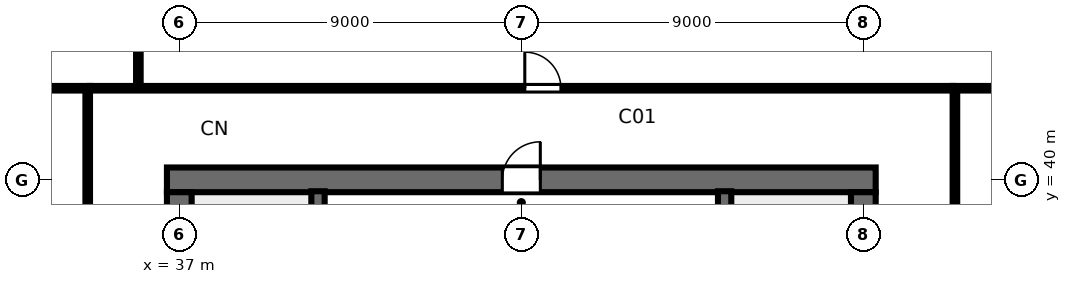
"""IFC4 building model, lengths in metres.
Left out: names, types, materials, properties, quantities, classifications, styles, units other than length and angle.
Written with IfcOpenShell. Run it as: python <this file> out.ifc"""

import sys

from ifc_helpers import new_model, si_unit, direction, frame, frame_2d, origin, place, context, subcontext, project, spatial, rectangle, extrude, element, fill, save


model = new_model("IFC4")
c1 = context("Model", 3, precision=1e-05, world=origin(), true_north=direction((0.0, 1.0)))
c2 = subcontext(c1, "Body", "Model", "MODEL_VIEW")
j1 = project(units=[si_unit("LENGTHUNIT", "METRE"), si_unit("PLANEANGLEUNIT", "RADIAN")], contexts=[c1])
p1 = place(None, origin())
s1 = spatial("IfcSite", under=j1, at=p1, CompositionType="ELEMENT")
p2 = place(p1, origin())
s2 = spatial("IfcBuilding", under=s1, at=p2, CompositionType="ELEMENT")
p3 = place(p2, frame((0.0, 0.0, 14.0)))
s3 = spatial("IfcBuildingStorey", under=s2, at=p3, CompositionType="ELEMENT", Elevation=14.0)
p4 = place(p3, frame((36.675, 40.0, 0.0), z_axis=(0.0, 0.0, 1.0), x_axis=(1.0, 0.0, 0.0)))
e1 = element("IfcWall", 1, at=p4, inside=s3, PredefinedType="SHEAR", context=c2, shape_type="SweptSolid", body=[
    extrude(rectangle(XDim=18.65, YDim=0.65, at=frame_2d((9.325, 0.0))), origin(), (0.0, 0.0, 1.0), 4.22),
])
p5 = place(p4, frame((8.825, 0.0, 0.0)))
e2 = element("IfcOpeningElement", 2, at=p5, cuts=e1, PredefinedType="OPENING", context=c2, shape_type="SweptSolid", body=[
    extrude(rectangle(XDim=1.0, YDim=2.15, at=frame_2d((0.5, 1.075))), frame((0.0, 0.335, 0.0), z_axis=(0.0, -1.0, 0.0), x_axis=(1.0, 0.0, 0.0)), (0.0, 0.0, 1.0), 0.67),
])
p6 = place(p3, frame((37.0, 24.325, 0.0), z_axis=(0.0, 0.0, 1.0), x_axis=(0.0, 1.0, 0.0)))
e3 = element("IfcWall", 3, at=p6, inside=s3, PredefinedType="SHEAR", context=c2, shape_type="SweptSolid", body=[
    extrude(rectangle(XDim=15.35, YDim=0.65, at=frame_2d((7.675, 0.0))), origin(), (0.0, 0.0, 1.0), 4.22),
])
p7 = place(p6, frame((5.2, 0.0, 0.0)))
e4 = element("IfcOpeningElement", 4, at=p7, cuts=e3, PredefinedType="OPENING", context=c2, shape_type="SweptSolid", body=[
    extrude(rectangle(XDim=1.15, YDim=2.15, at=frame_2d((0.575, 1.075))), frame((0.0, 0.335, 0.0), z_axis=(0.0, -1.0, 0.0), x_axis=(1.0, 0.0, 0.0)), (0.0, 0.0, 1.0), 0.67),
])
p8 = place(p3, frame((55.0, 24.325, 0.0), z_axis=(0.0, 0.0, 1.0), x_axis=(0.0, 1.0, 0.0)))
e5 = element("IfcWall", 5, at=p8, inside=s3, PredefinedType="SHEAR", context=c2, shape_type="SweptSolid", body=[
    extrude(rectangle(XDim=15.35, YDim=0.65, at=frame_2d((7.675, 0.0))), origin(), (0.0, 0.0, 1.0), 4.22),
])
p9 = place(p8, frame((5.2, 0.0, 0.0)))
e6 = element("IfcOpeningElement", 6, at=p9, cuts=e5, PredefinedType="OPENING", context=c2, shape_type="SweptSolid", body=[
    extrude(rectangle(XDim=1.15, YDim=2.15, at=frame_2d((0.575, 1.075))), frame((0.0, 0.335, 0.0), z_axis=(0.0, -1.0, 0.0), x_axis=(1.0, 0.0, 0.0)), (0.0, 0.0, 1.0), 0.67),
])
for number, where, z_axis, x_axis in (
    (7, (40.65, 32.0, 0.0), (0.0, 0.0, 1.0), (0.0, 1.0, 0.0)),
    (8, (51.35, 32.0, 0.0), (0.0, 0.0, 1.0), (0.0, 1.0, 0.0)),
):
    element("IfcWall", number, at=place(p3, frame(where, z_axis=z_axis, x_axis=x_axis)), inside=s3, PredefinedType="SHEAR", context=c2, shape_type="SweptSolid", body=[
        extrude(rectangle(XDim=7.7, YDim=0.35, at=frame_2d((3.85, 0.0))), origin(), (0.0, 0.0, 1.0), 4.5),
    ])
p10 = place(p3, frame((35.923, 42.41, 0.0), z_axis=(0.0, 0.0, 1.0), x_axis=(0.0, 1.0, 0.0)))
e9 = element("IfcWall", 9, at=p10, inside=s3, PredefinedType="PARTITIONING", context=c2, shape_type="SweptSolid", body=[
    extrude(rectangle(XDim=13.45, YDim=0.12, at=frame_2d((6.725, 0.0))), origin(), (0.0, 0.0, 1.0), 3.31),
])
p11 = place(p10, frame((1.4, 0.0, 0.0)))
e10 = element("IfcOpeningElement", 10, at=p11, cuts=e9, PredefinedType="OPENING", context=c2, shape_type="SweptSolid", body=[
    extrude(rectangle(XDim=0.9, YDim=2.15, at=frame_2d((0.45, 1.075))), frame((0.0, 0.07, 0.0), z_axis=(0.0, -1.0, 0.0), x_axis=(1.0, 0.0, 0.0)), (0.0, 0.0, 1.0), 0.14),
])
p12 = place(p3, frame((34.65, 42.41, 0.0), z_axis=(0.0, 0.0, 1.0), x_axis=(1.0, 0.0, 0.0)))
e11 = element("IfcWall", 11, at=p12, inside=s3, PredefinedType="PARTITIONING", context=c2, shape_type="SweptSolid", body=[
    extrude(rectangle(XDim=22.7, YDim=0.12, at=frame_2d((11.35, 0.0))), origin(), (0.0, 0.0, 1.0), 3.31),
])
p13 = place(p12, frame((11.441, 0.0, 0.0)))
e12 = element("IfcOpeningElement", 12, at=p13, cuts=e11, PredefinedType="OPENING", context=c2, shape_type="SweptSolid", body=[
    extrude(rectangle(XDim=0.95, YDim=2.15, at=frame_2d((0.475, 1.075))), frame((0.0, 0.07, 0.0), z_axis=(0.0, -1.0, 0.0), x_axis=(1.0, 0.0, 0.0)), (0.0, 0.0, 1.0), 0.14),
])
p14 = place(p3, frame((34.59, 21.65, 0.0), z_axis=(0.0, 0.0, 1.0), x_axis=(0.0, 1.0, 0.0)))
e13 = element("IfcWall", 13, at=p14, inside=s3, PredefinedType="PARTITIONING", context=c2, shape_type="SweptSolid", body=[
    extrude(rectangle(XDim=20.7, YDim=0.12, at=frame_2d((10.35, 0.0))), origin(), (0.0, 0.0, 1.0), 3.31),
])
p15 = place(p14, frame((9.875, 0.0, 0.0)))
e14 = element("IfcOpeningElement", 14, at=p15, cuts=e13, PredefinedType="OPENING", context=c2, shape_type="SweptSolid", body=[
    extrude(rectangle(XDim=0.95, YDim=2.15, at=frame_2d((0.475, 1.075))), frame((0.0, 0.07, 0.0), z_axis=(0.0, -1.0, 0.0), x_axis=(1.0, 0.0, 0.0)), (0.0, 0.0, 1.0), 0.14),
])
p16 = place(p3, frame((57.41, 21.65, 0.0), z_axis=(0.0, 0.0, 1.0), x_axis=(0.0, 1.0, 0.0)))
e15 = element("IfcWall", 15, at=p16, inside=s3, PredefinedType="PARTITIONING", context=c2, shape_type="SweptSolid", body=[
    extrude(rectangle(XDim=20.7, YDim=0.12, at=frame_2d((10.35, 0.0))), origin(), (0.0, 0.0, 1.0), 3.31),
])
p17 = place(p16, frame((2.226, 0.0, 0.0)))
e16 = element("IfcOpeningElement", 16, at=p17, cuts=e15, PredefinedType="OPENING", context=c2, shape_type="SweptSolid", body=[
    extrude(rectangle(XDim=0.95, YDim=2.15, at=frame_2d((0.475, 1.075))), frame((0.0, 0.07, 0.0), z_axis=(0.0, -1.0, 0.0), x_axis=(1.0, 0.0, 0.0)), (0.0, 0.0, 1.0), 0.14),
])
p18 = place(p16, frame((8.954, 0.0, 0.0)))
e17 = element("IfcOpeningElement", 17, at=p18, cuts=e15, PredefinedType="OPENING", context=c2, shape_type="SweptSolid", body=[
    extrude(rectangle(XDim=0.95, YDim=2.15, at=frame_2d((0.475, 1.075))), frame((0.0, 0.07, 0.0), z_axis=(0.0, -1.0, 0.0), x_axis=(1.0, 0.0, 0.0)), (0.0, 0.0, 1.0), 0.14),
])
p19 = place(p16, frame((16.603, 0.0, 0.0)))
e18 = element("IfcOpeningElement", 18, at=p19, cuts=e15, PredefinedType="OPENING", context=c2, shape_type="SweptSolid", body=[
    extrude(rectangle(XDim=0.95, YDim=2.15, at=frame_2d((0.475, 1.075))), frame((0.0, 0.07, 0.0), z_axis=(0.0, -1.0, 0.0), x_axis=(1.0, 0.0, 0.0)), (0.0, 0.0, 1.0), 0.14),
])
for number, where, z_axis, x_axis in (
    (19, (34.65, 42.41, 0.0), (0.0, 0.0, 1.0), (-1.0, 0.0, 0.0)),
    (20, (57.35, 42.41, 0.0), (0.0, 0.0, 1.0), (1.0, 0.0, 0.0)),
):
    element("IfcWall", number, at=place(p3, frame(where, z_axis=z_axis, x_axis=x_axis)), inside=s3, PredefinedType="PARTITIONING", context=c2, shape_type="SweptSolid", body=[
        extrude(rectangle(XDim=22.01, YDim=0.12, at=frame_2d((11.005, 0.0))), origin(), (0.0, 0.0, 1.0), 3.31),
    ])
p20 = place(p5, origin())
e21 = element("IfcDoor", 21, at=p20, inside=s3, OperationType="SINGLE_SWING_RIGHT", PredefinedType="DOOR", context=c2, shape_type="SweptSolid", body=[
    extrude(rectangle(XDim=1.0, YDim=2.15, at=frame_2d((0.5, 1.075))), frame((0.0, 0.025, 0.0), z_axis=(0.0, -1.0, 0.0), x_axis=(1.0, 0.0, 0.0)), (0.0, 0.0, 1.0), 0.05),
])
fill(e2, e21)
p21 = place(p13, origin())
e22 = element("IfcDoor", 22, at=p21, inside=s3, OperationType="SINGLE_SWING_LEFT", PredefinedType="DOOR", context=c2, shape_type="SweptSolid", body=[
    extrude(rectangle(XDim=0.95, YDim=2.15, at=frame_2d((0.475, 1.075))), frame((0.0, 0.025, 0.0), z_axis=(0.0, -1.0, 0.0), x_axis=(1.0, 0.0, 0.0)), (0.0, 0.0, 1.0), 0.05),
])
fill(e12, e22)
save(model, sys.argv[1])
